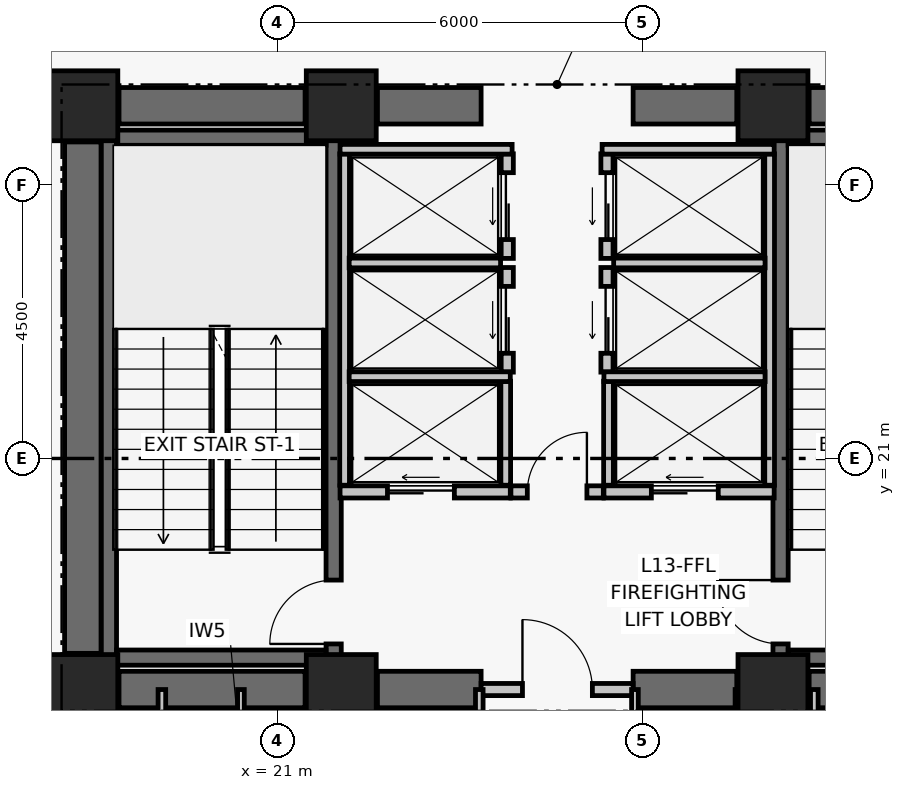
"""IFC4 building model, lengths in metres.
Left out: names, types, materials, properties, quantities, classifications, styles, units other than length and angle.
Written with IfcOpenShell. Run it as: python <this file> out.ifc"""

import sys

from ifc_helpers import new_model, si_unit, direction, frame, frame_2d, origin, origin_2d, place, context, subcontext, project, spatial, rectangle, extrude, element, fill, save


model = new_model("IFC4")
c1 = context("Model", 3, precision=1e-05, world=origin(), true_north=direction((0.0, 1.0)))
c2 = subcontext(c1, "Body", "Model", "MODEL_VIEW")
j1 = project(units=[si_unit("LENGTHUNIT", "METRE"), si_unit("PLANEANGLEUNIT", "RADIAN")], contexts=[c1])
p1 = place(None, origin())
s1 = spatial("IfcSite", under=j1, at=p1, CompositionType="ELEMENT")
p2 = place(p1, origin())
s2 = spatial("IfcBuilding", under=s1, at=p2, CompositionType="ELEMENT")
p3 = place(p2, frame((0.0, 0.0, 57.36)))
s3 = spatial("IfcBuildingStorey", under=s2, at=p3, CompositionType="ELEMENT", Elevation=57.36)
for number, where, z_axis, x_axis in (
    (1, (17.8, 17.2, 0.0), (0.0, 0.0, 1.0), (1.0, 0.0, 0.0)),
    (2, (22.05, 17.2, 0.0), (0.0, 0.0, 1.0), (1.0, 0.0, 0.0)),
    (3, (29.15, 17.2, 0.0), (0.0, 0.0, 1.0), (1.0, 0.0, 0.0)),
    (4, (17.8, 26.8, 0.0), (0.0, 0.0, 1.0), (1.0, 0.0, 0.0)),
    (5, (22.05, 26.8, 0.0), (0.0, 0.0, 1.0), (1.0, 0.0, 0.0)),
    (6, (29.15, 26.8, 0.0), (0.0, 0.0, 1.0), (1.0, 0.0, 0.0)),
):
    element("IfcColumn", number, at=place(p3, frame(where, z_axis=z_axis, x_axis=x_axis)), inside=s3, PredefinedType="COLUMN", context=c2, shape_type="SweptSolid", body=[
        extrude(rectangle(XDim=1.15, YDim=1.15, at=origin_2d()), origin(), (0.0, 0.0, 1.0), 3.72),
    ])
p4 = place(p3, frame((18.395, 17.2, 0.0), z_axis=(0.0, 0.0, 1.0), x_axis=(1.0, 0.0, 0.0)))
e7 = element("IfcWall", 7, at=p4, inside=s3, PredefinedType="SHEAR", context=c2, shape_type="SweptSolid", body=[
    extrude(rectangle(XDim=3.06, YDim=0.6, at=frame_2d((1.53, 0.0))), origin(), (0.0, 0.0, 1.0), 3.47),
])
p5 = place(p3, frame((22.645, 17.2, 0.0), z_axis=(0.0, 0.0, 1.0), x_axis=(1.0, 0.0, 0.0)))
e8 = element("IfcWall", 8, at=p5, inside=s3, PredefinedType="SHEAR", context=c2, shape_type="SweptSolid", body=[
    extrude(rectangle(XDim=1.705, YDim=0.6, at=frame_2d((0.853, 0.0))), origin(), (0.0, 0.0, 1.0), 3.47),
])
p6 = place(p3, frame((26.85, 17.2, 0.0), z_axis=(0.0, 0.0, 1.0), x_axis=(1.0, 0.0, 0.0)))
e9 = element("IfcWall", 9, at=p6, inside=s3, PredefinedType="SHEAR", context=c2, shape_type="SweptSolid", body=[
    extrude(rectangle(XDim=1.705, YDim=0.6, at=frame_2d((0.853, 0.0))), origin(), (0.0, 0.0, 1.0), 3.47),
])
p7 = place(p3, frame((29.745, 17.2, 0.0), z_axis=(0.0, 0.0, 1.0), x_axis=(1.0, 0.0, 0.0)))
e10 = element("IfcWall", 10, at=p7, inside=s3, PredefinedType="SHEAR", context=c2, shape_type="SweptSolid", body=[
    extrude(rectangle(XDim=3.06, YDim=0.6, at=frame_2d((1.53, 0.0))), origin(), (0.0, 0.0, 1.0), 3.47),
])
p8 = place(p3, frame((18.395, 26.8, 0.0), z_axis=(0.0, 0.0, 1.0), x_axis=(1.0, 0.0, 0.0)))
e11 = element("IfcWall", 11, at=p8, inside=s3, PredefinedType="SHEAR", context=c2, shape_type="SweptSolid", body=[
    extrude(rectangle(XDim=3.06, YDim=0.6, at=frame_2d((1.53, 0.0))), origin(), (0.0, 0.0, 1.0), 3.47),
])
p9 = place(p3, frame((22.645, 26.8, 0.0), z_axis=(0.0, 0.0, 1.0), x_axis=(1.0, 0.0, 0.0)))
e12 = element("IfcWall", 12, at=p9, inside=s3, PredefinedType="SHEAR", context=c2, shape_type="SweptSolid", body=[
    extrude(rectangle(XDim=1.705, YDim=0.6, at=frame_2d((0.853, 0.0))), origin(), (0.0, 0.0, 1.0), 3.47),
])
p10 = place(p3, frame((26.85, 26.8, 0.0), z_axis=(0.0, 0.0, 1.0), x_axis=(1.0, 0.0, 0.0)))
e13 = element("IfcWall", 13, at=p10, inside=s3, PredefinedType="SHEAR", context=c2, shape_type="SweptSolid", body=[
    extrude(rectangle(XDim=1.705, YDim=0.6, at=frame_2d((0.853, 0.0))), origin(), (0.0, 0.0, 1.0), 3.47),
])
p11 = place(p3, frame((29.745, 26.8, 0.0), z_axis=(0.0, 0.0, 1.0), x_axis=(1.0, 0.0, 0.0)))
e14 = element("IfcWall", 14, at=p11, inside=s3, PredefinedType="SHEAR", context=c2, shape_type="SweptSolid", body=[
    extrude(rectangle(XDim=3.06, YDim=0.6, at=frame_2d((1.53, 0.0))), origin(), (0.0, 0.0, 1.0), 3.47),
])
p12 = place(p3, frame((17.8, 17.795, 0.0), z_axis=(0.0, 0.0, 1.0), x_axis=(0.0, 1.0, 0.0)))
e15 = element("IfcWall", 15, at=p12, inside=s3, PredefinedType="SHEAR", context=c2, shape_type="SweptSolid", body=[
    extrude(rectangle(XDim=8.41, YDim=0.6, at=frame_2d((4.205, 0.0))), origin(), (0.0, 0.0, 1.0), 3.47),
])
p13 = place(p3, frame((18.229, 17.6, 0.0), z_axis=(0.0, 0.0, 1.0), x_axis=(0.0, 1.0, 0.0)))
e16 = element("IfcWall", 16, at=p13, inside=s3, PredefinedType="SHEAR", context=c2, shape_type="SweptSolid", body=[
    extrude(rectangle(XDim=8.8, YDim=0.25, at=frame_2d((4.4, 0.0))), origin(), (0.0, 0.0, 1.0), 3.47),
])
p14 = place(p3, frame((21.925, 17.6, 0.0), z_axis=(0.0, 0.0, 1.0), x_axis=(0.0, 1.0, 0.0)))
e17 = element("IfcWall", 17, at=p14, inside=s3, PredefinedType="SHEAR", context=c2, shape_type="SweptSolid", body=[
    extrude(rectangle(XDim=8.8, YDim=0.25, at=frame_2d((4.4, 0.0))), origin(), (0.0, 0.0, 1.0), 3.47),
])
p15 = place(p14, frame((0.35, 0.0, 0.0)))
e18 = element("IfcOpeningElement", 18, at=p15, cuts=e17, PredefinedType="OPENING", context=c2, shape_type="SweptSolid", body=[
    extrude(rectangle(XDim=1.05, YDim=2.08, at=frame_2d((0.525, 1.04))), frame((0.0, 0.135, 0.0), z_axis=(0.0, -1.0, 0.0), x_axis=(1.0, 0.0, 0.0)), (0.0, 0.0, 1.0), 0.27),
])
for number, where, z_axis, x_axis in (
    (19, (18.354, 17.725, 0.0), (0.0, 0.0, 1.0), (1.0, 0.0, 0.0)),
    (20, (18.354, 26.275, 0.0), (0.0, 0.0, 1.0), (1.0, 0.0, 0.0)),
):
    element("IfcWall", number, at=place(p3, frame(where, z_axis=z_axis, x_axis=x_axis)), inside=s3, PredefinedType="SHEAR", context=c2, shape_type="SweptSolid", body=[
        extrude(rectangle(XDim=3.446, YDim=0.25, at=frame_2d((1.723, 0.0))), origin(), (0.0, 0.0, 1.0), 3.47),
    ])
p16 = place(p3, frame((29.275, 17.6, 0.0), z_axis=(0.0, 0.0, 1.0), x_axis=(0.0, 1.0, 0.0)))
e21 = element("IfcWall", 21, at=p16, inside=s3, PredefinedType="SHEAR", context=c2, shape_type="SweptSolid", body=[
    extrude(rectangle(XDim=8.8, YDim=0.25, at=frame_2d((4.4, 0.0))), origin(), (0.0, 0.0, 1.0), 3.47),
])
p17 = place(p16, frame((0.35, 0.0, 0.0)))
e22 = element("IfcOpeningElement", 22, at=p17, cuts=e21, PredefinedType="OPENING", context=c2, shape_type="SweptSolid", body=[
    extrude(rectangle(XDim=1.05, YDim=2.08, at=frame_2d((0.525, 1.04))), frame((0.0, 0.135, 0.0), z_axis=(0.0, -1.0, 0.0), x_axis=(1.0, 0.0, 0.0)), (0.0, 0.0, 1.0), 0.27),
])
for number, where, z_axis, x_axis in (
    (23, (29.4, 17.725, 0.0), (0.0, 0.0, 1.0), (1.0, 0.0, 0.0)),
    (24, (29.4, 26.275, 0.0), (0.0, 0.0, 1.0), (1.0, 0.0, 0.0)),
):
    element("IfcWall", number, at=place(p3, frame(where, z_axis=z_axis, x_axis=x_axis)), inside=s3, PredefinedType="SHEAR", context=c2, shape_type="SweptSolid", body=[
        extrude(rectangle(XDim=3.446, YDim=0.25, at=frame_2d((1.723, 0.0))), origin(), (0.0, 0.0, 1.0), 3.47),
    ])
p18 = place(p3, frame((24.35, 17.2, 0.0), z_axis=(0.0, 0.0, 1.0), x_axis=(1.0, 0.0, 0.0)))
e25 = element("IfcWall", 25, at=p18, inside=s3, PredefinedType="PARTITIONING", context=c2, shape_type="SweptSolid", body=[
    extrude(rectangle(XDim=2.5, YDim=0.2, at=frame_2d((1.25, 0.0))), origin(), (0.0, 0.0, 1.0), 2.6),
])
p19 = place(p18, frame((0.68, 0.0, 0.0)))
e26 = element("IfcOpeningElement", 26, at=p19, cuts=e25, PredefinedType="OPENING", context=c2, shape_type="SweptSolid", body=[
    extrude(rectangle(XDim=1.15, YDim=2.08, at=frame_2d((0.575, 1.04))), frame((0.0, 0.11, 0.0), z_axis=(0.0, -1.0, 0.0), x_axis=(1.0, 0.0, 0.0)), (0.0, 0.0, 1.0), 0.22),
])
p20 = place(p3, frame((24.84, 20.45, 0.0), z_axis=(0.0, 0.0, 1.0), x_axis=(1.0, 0.0, 0.0)))
e27 = element("IfcWall", 27, at=p20, inside=s3, PredefinedType="PARTITIONING", context=c2, shape_type="SweptSolid", body=[
    extrude(rectangle(XDim=1.52, YDim=0.2, at=frame_2d((0.76, 0.0))), origin(), (0.0, 0.0, 1.0), 3.47),
])
p21 = place(p20, frame((0.27, 0.0, 0.0)))
e28 = element("IfcOpeningElement", 28, at=p21, cuts=e27, PredefinedType="OPENING", context=c2, shape_type="SweptSolid", body=[
    extrude(rectangle(XDim=0.98, YDim=2.06, at=frame_2d((0.49, 1.03))), frame((0.0, 0.11, 0.0), z_axis=(0.0, -1.0, 0.0), x_axis=(1.0, 0.0, 0.0)), (0.0, 0.0, 1.0), 0.22),
])
p22 = place(p3, frame((22.03, 20.45, 0.0), z_axis=(0.0, 0.0, 1.0), x_axis=(1.0, 0.0, 0.0)))
e29 = element("IfcWall", 29, at=p22, inside=s3, PredefinedType="PARTITIONING", context=c2, shape_type="SweptSolid", body=[
    extrude(rectangle(XDim=2.8, YDim=0.2, at=frame_2d((1.4, 0.0))), origin(), (0.0, 0.0, 1.0), 3.47),
])
p23 = place(p22, frame((0.78, 0.0, 0.0)))
e30 = element("IfcOpeningElement", 30, at=p23, cuts=e29, PredefinedType="OPENING", context=c2, shape_type="SweptSolid", body=[
    extrude(rectangle(XDim=1.1, YDim=2.08, at=frame_2d((0.55, 1.04))), frame((0.0, 0.11, 0.0), z_axis=(0.0, -1.0, 0.0), x_axis=(1.0, 0.0, 0.0)), (0.0, 0.0, 1.0), 0.22),
])
p24 = place(p3, frame((26.37, 20.45, 0.0), z_axis=(0.0, 0.0, 1.0), x_axis=(1.0, 0.0, 0.0)))
e31 = element("IfcWall", 31, at=p24, inside=s3, PredefinedType="PARTITIONING", context=c2, shape_type="SweptSolid", body=[
    extrude(rectangle(XDim=2.8, YDim=0.2, at=frame_2d((1.4, 0.0))), origin(), (0.0, 0.0, 1.0), 3.47),
])
p25 = place(p24, frame((0.78, 0.0, 0.0)))
e32 = element("IfcOpeningElement", 32, at=p25, cuts=e31, PredefinedType="OPENING", context=c2, shape_type="SweptSolid", body=[
    extrude(rectangle(XDim=1.1, YDim=2.08, at=frame_2d((0.55, 1.04))), frame((0.0, 0.11, 0.0), z_axis=(0.0, -1.0, 0.0), x_axis=(1.0, 0.0, 0.0)), (0.0, 0.0, 1.0), 0.22),
])
p26 = place(p3, frame((24.78, 22.42, 0.0), z_axis=(0.0, 0.0, 1.0), x_axis=(0.0, 1.0, 0.0)))
e33 = element("IfcWall", 33, at=p26, inside=s3, PredefinedType="PARTITIONING", context=c2, shape_type="SweptSolid", body=[
    extrude(rectangle(XDim=1.72, YDim=0.2, at=frame_2d((0.86, 0.0))), origin(), (0.0, 0.0, 1.0), 3.47),
])
p27 = place(p26, frame((0.31, 0.0, 0.0)))
e34 = element("IfcOpeningElement", 34, at=p27, cuts=e33, PredefinedType="OPENING", context=c2, shape_type="SweptSolid", body=[
    extrude(rectangle(XDim=1.1, YDim=2.08, at=frame_2d((0.55, 1.04))), frame((0.0, 0.11, 0.0), z_axis=(0.0, -1.0, 0.0), x_axis=(1.0, 0.0, 0.0)), (0.0, 0.0, 1.0), 0.22),
])
p28 = place(p3, frame((24.78, 24.29, 0.0), z_axis=(0.0, 0.0, 1.0), x_axis=(0.0, 1.0, 0.0)))
e35 = element("IfcWall", 35, at=p28, inside=s3, PredefinedType="PARTITIONING", context=c2, shape_type="SweptSolid", body=[
    extrude(rectangle(XDim=1.72, YDim=0.2, at=frame_2d((0.86, 0.0))), origin(), (0.0, 0.0, 1.0), 3.47),
])
p29 = place(p28, frame((0.31, 0.0, 0.0)))
e36 = element("IfcOpeningElement", 36, at=p29, cuts=e35, PredefinedType="OPENING", context=c2, shape_type="SweptSolid", body=[
    extrude(rectangle(XDim=1.1, YDim=2.08, at=frame_2d((0.55, 1.04))), frame((0.0, 0.11, 0.0), z_axis=(0.0, -1.0, 0.0), x_axis=(1.0, 0.0, 0.0)), (0.0, 0.0, 1.0), 0.22),
])
p30 = place(p3, frame((26.42, 22.42, 0.0), z_axis=(0.0, 0.0, 1.0), x_axis=(0.0, 1.0, 0.0)))
e37 = element("IfcWall", 37, at=p30, inside=s3, PredefinedType="PARTITIONING", context=c2, shape_type="SweptSolid", body=[
    extrude(rectangle(XDim=1.72, YDim=0.2, at=frame_2d((0.86, 0.0))), origin(), (0.0, 0.0, 1.0), 3.47),
])
p31 = place(p30, frame((0.31, 0.0, 0.0)))
e38 = element("IfcOpeningElement", 38, at=p31, cuts=e37, PredefinedType="OPENING", context=c2, shape_type="SweptSolid", body=[
    extrude(rectangle(XDim=1.1, YDim=2.08, at=frame_2d((0.55, 1.04))), frame((0.0, 0.11, 0.0), z_axis=(0.0, -1.0, 0.0), x_axis=(1.0, 0.0, 0.0)), (0.0, 0.0, 1.0), 0.22),
])
p32 = place(p3, frame((26.42, 24.29, 0.0), z_axis=(0.0, 0.0, 1.0), x_axis=(0.0, 1.0, 0.0)))
e39 = element("IfcWall", 39, at=p32, inside=s3, PredefinedType="PARTITIONING", context=c2, shape_type="SweptSolid", body=[
    extrude(rectangle(XDim=1.72, YDim=0.2, at=frame_2d((0.86, 0.0))), origin(), (0.0, 0.0, 1.0), 3.47),
])
p33 = place(p32, frame((0.31, 0.0, 0.0)))
e40 = element("IfcOpeningElement", 40, at=p33, cuts=e39, PredefinedType="OPENING", context=c2, shape_type="SweptSolid", body=[
    extrude(rectangle(XDim=1.1, YDim=2.08, at=frame_2d((0.55, 1.04))), frame((0.0, 0.11, 0.0), z_axis=(0.0, -1.0, 0.0), x_axis=(1.0, 0.0, 0.0)), (0.0, 0.0, 1.0), 0.22),
])
p34 = place(p3, frame((22.105, 20.56, 0.0), z_axis=(0.0, 0.0, 1.0), x_axis=(0.0, 1.0, 0.0)))
e41 = element("IfcWall", 41, at=p34, inside=s3, PredefinedType="PARTITIONING", context=c2, shape_type="SweptSolid", body=[
    extrude(rectangle(XDim=5.45, YDim=0.16, at=frame_2d((2.725, 0.0))), origin(), (0.0, 0.0, 1.0), 3.47),
])
p35 = place(p3, frame((24.755, 20.56, 0.0), z_axis=(0.0, 0.0, 1.0), x_axis=(0.0, 1.0, 0.0)))
e42 = element("IfcWall", 42, at=p35, inside=s3, PredefinedType="PARTITIONING", context=c2, shape_type="SweptSolid", body=[
    extrude(rectangle(XDim=1.71, YDim=0.16, at=frame_2d((0.855, 0.0))), origin(), (0.0, 0.0, 1.0), 3.47),
])
p36 = place(p3, frame((22.18, 22.345, 0.0), z_axis=(0.0, 0.0, 1.0), x_axis=(1.0, 0.0, 0.0)))
e43 = element("IfcWall", 43, at=p36, inside=s3, PredefinedType="PARTITIONING", context=c2, shape_type="SweptSolid", body=[
    extrude(rectangle(XDim=2.65, YDim=0.16, at=frame_2d((1.325, 0.0))), origin(), (0.0, 0.0, 1.0), 3.47),
])
p37 = place(p3, frame((22.18, 24.215, 0.0), z_axis=(0.0, 0.0, 1.0), x_axis=(1.0, 0.0, 0.0)))
e44 = element("IfcWall", 44, at=p37, inside=s3, PredefinedType="PARTITIONING", context=c2, shape_type="SweptSolid", body=[
    extrude(rectangle(XDim=2.49, YDim=0.16, at=frame_2d((1.245, 0.0))), origin(), (0.0, 0.0, 1.0), 3.47),
])
p38 = place(p3, frame((22.03, 26.085, 0.0), z_axis=(0.0, 0.0, 1.0), x_axis=(1.0, 0.0, 0.0)))
e45 = element("IfcWall", 45, at=p38, inside=s3, PredefinedType="PARTITIONING", context=c2, shape_type="SweptSolid", body=[
    extrude(rectangle(XDim=2.83, YDim=0.16, at=frame_2d((1.415, 0.0))), origin(), (0.0, 0.0, 1.0), 3.47),
])
p39 = place(p3, frame((29.095, 20.56, 0.0), z_axis=(0.0, 0.0, 1.0), x_axis=(0.0, 1.0, 0.0)))
e46 = element("IfcWall", 46, at=p39, inside=s3, PredefinedType="PARTITIONING", context=c2, shape_type="SweptSolid", body=[
    extrude(rectangle(XDim=5.45, YDim=0.16, at=frame_2d((2.725, 0.0))), origin(), (0.0, 0.0, 1.0), 3.47),
])
p40 = place(p3, frame((26.445, 20.56, 0.0), z_axis=(0.0, 0.0, 1.0), x_axis=(0.0, 1.0, 0.0)))
e47 = element("IfcWall", 47, at=p40, inside=s3, PredefinedType="PARTITIONING", context=c2, shape_type="SweptSolid", body=[
    extrude(rectangle(XDim=1.71, YDim=0.16, at=frame_2d((0.855, 0.0))), origin(), (0.0, 0.0, 1.0), 3.47),
])
p41 = place(p3, frame((26.37, 22.345, 0.0), z_axis=(0.0, 0.0, 1.0), x_axis=(1.0, 0.0, 0.0)))
e48 = element("IfcWall", 48, at=p41, inside=s3, PredefinedType="PARTITIONING", context=c2, shape_type="SweptSolid", body=[
    extrude(rectangle(XDim=2.65, YDim=0.16, at=frame_2d((1.325, 0.0))), origin(), (0.0, 0.0, 1.0), 3.47),
])
p42 = place(p3, frame((26.53, 24.215, 0.0), z_axis=(0.0, 0.0, 1.0), x_axis=(1.0, 0.0, 0.0)))
e49 = element("IfcWall", 49, at=p42, inside=s3, PredefinedType="PARTITIONING", context=c2, shape_type="SweptSolid", body=[
    extrude(rectangle(XDim=2.49, YDim=0.16, at=frame_2d((1.245, 0.0))), origin(), (0.0, 0.0, 1.0), 3.47),
])
p43 = place(p3, frame((26.34, 26.085, 0.0), z_axis=(0.0, 0.0, 1.0), x_axis=(1.0, 0.0, 0.0)))
e50 = element("IfcWall", 50, at=p43, inside=s3, PredefinedType="PARTITIONING", context=c2, shape_type="SweptSolid", body=[
    extrude(rectangle(XDim=2.83, YDim=0.16, at=frame_2d((1.415, 0.0))), origin(), (0.0, 0.0, 1.0), 3.47),
])
p44 = place(p3, frame((19.1, 14.95, 0.0), z_axis=(0.0, 0.0, 1.0), x_axis=(0.0, 1.0, 0.0)))
e51 = element("IfcWall", 51, at=p44, inside=s3, PredefinedType="PARTITIONING", context=c2, shape_type="SweptSolid", body=[
    extrude(rectangle(XDim=2.25, YDim=0.125, at=frame_2d((1.125, 0.0))), origin(), (0.0, 0.0, 1.0), 2.6),
])
p45 = place(p3, frame((20.4, 14.95, 0.0), z_axis=(0.0, 0.0, 1.0), x_axis=(0.0, 1.0, 0.0)))
e52 = element("IfcWall", 52, at=p45, inside=s3, PredefinedType="PARTITIONING", context=c2, shape_type="SweptSolid", body=[
    extrude(rectangle(XDim=2.25, YDim=0.11, at=frame_2d((1.125, 0.0))), origin(), (0.0, 0.0, 1.0), 2.6),
])
for number, where, z_axis, x_axis in (
    (53, (22.36, 14.95, 0.0), (0.0, 0.0, 1.0), (0.0, 1.0, 0.0)),
    (54, (24.32, 14.95, 0.0), (0.0, 0.0, 1.0), (0.0, 1.0, 0.0)),
):
    element("IfcWall", number, at=place(p3, frame(where, z_axis=z_axis, x_axis=x_axis)), inside=s3, PredefinedType="PARTITIONING", context=c2, shape_type="SweptSolid", body=[
        extrude(rectangle(XDim=2.25, YDim=0.125, at=frame_2d((1.125, 0.0))), origin(), (0.0, 0.0, 1.0), 2.6),
    ])
p46 = place(p3, frame((26.88, 14.95, 0.0), z_axis=(0.0, 0.0, 1.0), x_axis=(0.0, 1.0, 0.0)))
e55 = element("IfcWall", 55, at=p46, inside=s3, PredefinedType="PARTITIONING", context=c2, shape_type="SweptSolid", body=[
    extrude(rectangle(XDim=2.25, YDim=0.11, at=frame_2d((1.125, 0.0))), origin(), (0.0, 0.0, 1.0), 2.6),
])
for number, where, z_axis, x_axis in (
    (56, (28.59, 14.95, 0.0), (0.0, 0.0, 1.0), (0.0, 1.0, 0.0)),
    (57, (29.83, 14.95, 0.0), (0.0, 0.0, 1.0), (0.0, 1.0, 0.0)),
):
    element("IfcWall", number, at=place(p3, frame(where, z_axis=z_axis, x_axis=x_axis)), inside=s3, PredefinedType="PARTITIONING", context=c2, shape_type="SweptSolid", body=[
        extrude(rectangle(XDim=2.25, YDim=0.125, at=frame_2d((1.125, 0.0))), origin(), (0.0, 0.0, 1.0), 2.6),
    ])
p47 = place(p3, frame((19.737, 36.601, 0.0), z_axis=(0.0, 0.0, 1.0), x_axis=(-0.573585467262, -0.819145720703, 0.0)))
e58 = element("IfcWall", 58, at=p47, inside=s3, PredefinedType="PARTITIONING", context=c2, shape_type="SweptSolid", body=[
    extrude(rectangle(XDim=15.703, YDim=0.125, at=frame_2d((7.851, 0.0))), origin(), (0.0, 0.0, 1.0), 2.6),
])
p48 = place(p47, frame((5.614, 0.0, 0.0)))
e59 = element("IfcOpeningElement", 59, at=p48, cuts=e58, PredefinedType="OPENING", context=c2, shape_type="SweptSolid", body=[
    extrude(rectangle(XDim=0.92, YDim=2.05, at=frame_2d((0.46, 1.025))), frame((0.0, 0.073, 0.0), z_axis=(0.0, -1.0, 0.0), x_axis=(1.0, 0.0, 0.0)), (0.0, 0.0, 1.0), 0.145),
])
p49 = place(p15, origin())
e60 = element("IfcDoor", 60, at=p49, inside=s3, OperationType="SINGLE_SWING_LEFT", PredefinedType="DOOR", context=c2, shape_type="SweptSolid", body=[
    extrude(rectangle(XDim=1.05, YDim=2.08, at=frame_2d((0.525, 1.04))), frame((0.0, 0.025, 0.0), z_axis=(0.0, -1.0, 0.0), x_axis=(1.0, 0.0, 0.0)), (0.0, 0.0, 1.0), 0.05),
])
fill(e18, e60)
p50 = place(p17, origin())
e61 = element("IfcDoor", 61, at=p50, inside=s3, OperationType="SINGLE_SWING_RIGHT", PredefinedType="DOOR", context=c2, shape_type="SweptSolid", body=[
    extrude(rectangle(XDim=1.05, YDim=2.08, at=frame_2d((0.525, 1.04))), frame((0.0, 0.025, 0.0), z_axis=(0.0, -1.0, 0.0), x_axis=(1.0, 0.0, 0.0)), (0.0, 0.0, 1.0), 0.05),
])
fill(e22, e61)
p51 = place(p19, origin())
e62 = element("IfcDoor", 62, at=p51, inside=s3, OperationType="SINGLE_SWING_LEFT", PredefinedType="DOOR", context=c2, shape_type="SweptSolid", body=[
    extrude(rectangle(XDim=1.15, YDim=2.08, at=frame_2d((0.575, 1.04))), frame((0.0, 0.025, 0.0), z_axis=(0.0, -1.0, 0.0), x_axis=(1.0, 0.0, 0.0)), (0.0, 0.0, 1.0), 0.05),
])
fill(e26, e62)
p52 = place(p21, origin())
e63 = element("IfcDoor", 63, at=p52, inside=s3, OperationType="SINGLE_SWING_RIGHT", PredefinedType="DOOR", context=c2, shape_type="SweptSolid", body=[
    extrude(rectangle(XDim=0.98, YDim=2.06, at=frame_2d((0.49, 1.03))), frame((0.0, 0.025, 0.0), z_axis=(0.0, -1.0, 0.0), x_axis=(1.0, 0.0, 0.0)), (0.0, 0.0, 1.0), 0.05),
])
fill(e28, e63)
p53 = place(p23, origin())
e64 = element("IfcDoor", 64, at=p53, inside=s3, OperationType="DOUBLE_DOOR_SLIDING", PredefinedType="DOOR", context=c2, shape_type="SweptSolid", body=[
    extrude(rectangle(XDim=1.1, YDim=2.08, at=frame_2d((0.55, 1.04))), frame((0.0, 0.025, 0.0), z_axis=(0.0, -1.0, 0.0), x_axis=(1.0, 0.0, 0.0)), (0.0, 0.0, 1.0), 0.05),
])
fill(e30, e64)
p54 = place(p25, origin())
e65 = element("IfcDoor", 65, at=p54, inside=s3, OperationType="DOUBLE_DOOR_SLIDING", PredefinedType="DOOR", context=c2, shape_type="SweptSolid", body=[
    extrude(rectangle(XDim=1.1, YDim=2.08, at=frame_2d((0.55, 1.04))), frame((0.0, 0.025, 0.0), z_axis=(0.0, -1.0, 0.0), x_axis=(1.0, 0.0, 0.0)), (0.0, 0.0, 1.0), 0.05),
])
fill(e32, e65)
p55 = place(p27, origin())
e66 = element("IfcDoor", 66, at=p55, inside=s3, OperationType="DOUBLE_DOOR_SLIDING", PredefinedType="DOOR", context=c2, shape_type="SweptSolid", body=[
    extrude(rectangle(XDim=1.1, YDim=2.08, at=frame_2d((0.55, 1.04))), frame((0.0, 0.025, 0.0), z_axis=(0.0, -1.0, 0.0), x_axis=(1.0, 0.0, 0.0)), (0.0, 0.0, 1.0), 0.05),
])
fill(e34, e66)
p56 = place(p29, origin())
e67 = element("IfcDoor", 67, at=p56, inside=s3, OperationType="DOUBLE_DOOR_SLIDING", PredefinedType="DOOR", context=c2, shape_type="SweptSolid", body=[
    extrude(rectangle(XDim=1.1, YDim=2.08, at=frame_2d((0.55, 1.04))), frame((0.0, 0.025, 0.0), z_axis=(0.0, -1.0, 0.0), x_axis=(1.0, 0.0, 0.0)), (0.0, 0.0, 1.0), 0.05),
])
fill(e36, e67)
p57 = place(p31, origin())
e68 = element("IfcDoor", 68, at=p57, inside=s3, OperationType="DOUBLE_DOOR_SLIDING", PredefinedType="DOOR", context=c2, shape_type="SweptSolid", body=[
    extrude(rectangle(XDim=1.1, YDim=2.08, at=frame_2d((0.55, 1.04))), frame((0.0, 0.025, 0.0), z_axis=(0.0, -1.0, 0.0), x_axis=(1.0, 0.0, 0.0)), (0.0, 0.0, 1.0), 0.05),
])
fill(e38, e68)
p58 = place(p33, origin())
e69 = element("IfcDoor", 69, at=p58, inside=s3, OperationType="DOUBLE_DOOR_SLIDING", PredefinedType="DOOR", context=c2, shape_type="SweptSolid", body=[
    extrude(rectangle(XDim=1.1, YDim=2.08, at=frame_2d((0.55, 1.04))), frame((0.0, 0.025, 0.0), z_axis=(0.0, -1.0, 0.0), x_axis=(1.0, 0.0, 0.0)), (0.0, 0.0, 1.0), 0.05),
])
fill(e40, e69)
save(model, sys.argv[1])
